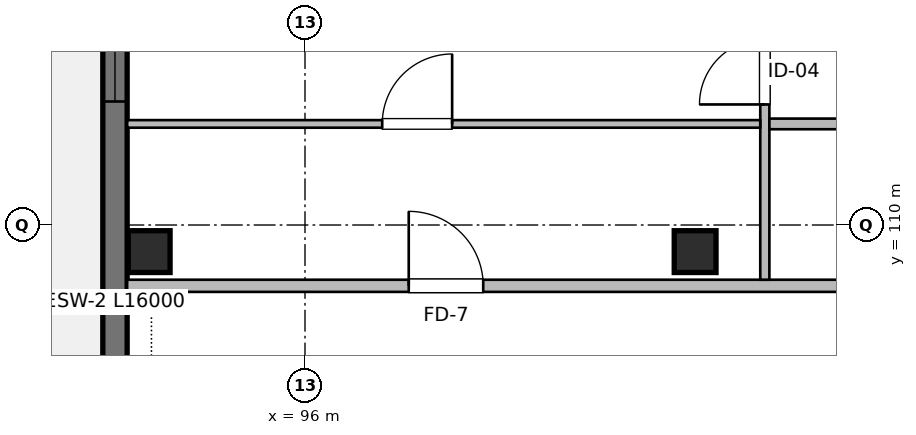
"""IFC4 building model, lengths in metres.
Left out: names, types, materials, properties, quantities, classifications, styles, units other than length and angle.
Written with IfcOpenShell. Run it as: python <this file> out.ifc"""

import sys

from ifc_helpers import new_model, si_unit, direction, frame, frame_2d, origin, origin_2d, place, context, subcontext, project, spatial, rectangle, extrude, element, fill, save


model = new_model("IFC4")
c1 = context("Model", 3, precision=1e-05, world=origin(), true_north=direction((0.0, 1.0)))
c2 = subcontext(c1, "Body", "Model", "MODEL_VIEW")
j1 = project(units=[si_unit("LENGTHUNIT", "METRE"), si_unit("PLANEANGLEUNIT", "RADIAN")], contexts=[c1])
p1 = place(None, origin())
s1 = spatial("IfcSite", under=j1, at=p1, CompositionType="ELEMENT")
p2 = place(p1, origin())
s2 = spatial("IfcBuilding", under=s1, at=p2, CompositionType="ELEMENT")
p3 = place(p2, frame((0.0, 0.0, 23.36)))
s3 = spatial("IfcBuildingStorey", under=s2, at=p3, CompositionType="ELEMENT", Elevation=23.36)
for number, where, z_axis, x_axis in (
    (1, (93.95, 109.65, 0.0), (0.0, 0.0, 1.0), (1.0, 0.0, 0.0)),
    (2, (101.133, 109.65, 0.0), (0.0, 0.0, 1.0), (1.0, 0.0, 0.0)),
):
    element("IfcColumn", number, at=place(p3, frame(where, z_axis=z_axis, x_axis=x_axis)), inside=s3, PredefinedType="COLUMN", context=c2, shape_type="SweptSolid", body=[
        extrude(rectangle(XDim=0.55, YDim=0.55, at=origin_2d()), origin(), (0.0, 0.0, 1.0), 3.2),
    ])
p4 = place(p3, frame((93.5, 100.0, 0.0), z_axis=(0.0, 0.0, 1.0), x_axis=(0.0, 1.0, 0.0)))
e3 = element("IfcWall", 3, at=p4, inside=s3, PredefinedType="SHEAR", context=c2, shape_type="SweptSolid", body=[
    extrude(rectangle(XDim=16.0, YDim=0.32, at=frame_2d((8.0, 0.0))), origin(), (0.0, 0.0, 1.0), 2.98),
])
p5 = place(p4, frame((3.4, 0.0, 0.0)))
e4 = element("IfcOpeningElement", 4, at=p5, cuts=e3, PredefinedType="OPENING", context=c2, shape_type="SweptSolid", body=[
    extrude(rectangle(XDim=1.2, YDim=2.2, at=frame_2d((0.6, 1.1))), frame((0.0, 0.17, 0.0), z_axis=(0.0, -1.0, 0.0), x_axis=(1.0, 0.0, 0.0)), (0.0, 0.0, 1.0), 0.34),
])
p6 = place(p4, frame((5.3, 0.0, 0.9)))
e5 = element("IfcOpeningElement", 5, at=p6, cuts=e3, PredefinedType="OPENING", context=c2, shape_type="SweptSolid", body=[
    extrude(rectangle(XDim=1.05, YDim=1.15, at=frame_2d((0.525, 0.575))), frame((0.0, 0.17, 0.0), z_axis=(0.0, -1.0, 0.0), x_axis=(1.0, 0.0, 0.0)), (0.0, 0.0, 1.0), 0.34),
])
p7 = place(p4, frame((11.625, 0.0, 0.77)))
e6 = element("IfcOpeningElement", 6, at=p7, cuts=e3, PredefinedType="OPENING", context=c2, shape_type="SweptSolid", body=[
    extrude(rectangle(XDim=1.65, YDim=1.45, at=frame_2d((0.825, 0.725))), frame((0.0, 0.17, 0.0), z_axis=(0.0, -1.0, 0.0), x_axis=(1.0, 0.0, 0.0)), (0.0, 0.0, 1.0), 0.34),
])
p8 = place(p3, frame((93.66, 109.2, 0.0), z_axis=(0.0, 0.0, 1.0), x_axis=(1.0, 0.0, 0.0)))
e7 = element("IfcWall", 7, at=p8, inside=s3, PredefinedType="PARTITIONING", context=c2, shape_type="SweptSolid", body=[
    extrude(rectangle(XDim=43.68, YDim=0.16, at=frame_2d((21.84, 0.0))), origin(), (0.0, 0.0, 1.0), 2.935),
])
p9 = place(p8, frame((3.705, 0.0, 0.0)))
e8 = element("IfcOpeningElement", 8, at=p9, cuts=e7, PredefinedType="OPENING", context=c2, shape_type="SweptSolid", body=[
    extrude(rectangle(XDim=0.98, YDim=2.15, at=frame_2d((0.49, 1.075))), frame((0.0, 0.09, 0.0), z_axis=(0.0, -1.0, 0.0), x_axis=(1.0, 0.0, 0.0)), (0.0, 0.0, 1.0), 0.18),
])
p10 = place(p8, frame((18.33, 0.0, 0.0)))
e9 = element("IfcOpeningElement", 9, at=p10, cuts=e7, PredefinedType="OPENING", context=c2, shape_type="SweptSolid", body=[
    extrude(rectangle(XDim=0.98, YDim=2.15, at=frame_2d((0.49, 1.075))), frame((0.0, 0.09, 0.0), z_axis=(0.0, -1.0, 0.0), x_axis=(1.0, 0.0, 0.0)), (0.0, 0.0, 1.0), 0.18),
])
p11 = place(p8, frame((32.915, 0.0, 0.0)))
e10 = element("IfcOpeningElement", 10, at=p11, cuts=e7, PredefinedType="OPENING", context=c2, shape_type="SweptSolid", body=[
    extrude(rectangle(XDim=0.98, YDim=2.15, at=frame_2d((0.49, 1.075))), frame((0.0, 0.09, 0.0), z_axis=(0.0, -1.0, 0.0), x_axis=(1.0, 0.0, 0.0)), (0.0, 0.0, 1.0), 0.18),
])
p12 = place(p3, frame((102.05, 109.28, 0.0), z_axis=(0.0, 0.0, 1.0), x_axis=(0.0, 1.0, 0.0)))
e11 = element("IfcWall", 11, at=p12, inside=s3, PredefinedType="PARTITIONING", context=c2, shape_type="SweptSolid", body=[
    extrude(rectangle(XDim=6.6, YDim=0.12, at=frame_2d((3.3, 0.0))), origin(), (0.0, 0.0, 1.0), 2.935),
])
p13 = place(p12, frame((2.306, 0.0, 0.0)))
e12 = element("IfcOpeningElement", 12, at=p13, cuts=e11, PredefinedType="OPENING", context=c2, shape_type="SweptSolid", body=[
    extrude(rectangle(XDim=0.86, YDim=2.1, at=frame_2d((0.43, 1.05))), frame((0.0, 0.07, 0.0), z_axis=(0.0, -1.0, 0.0), x_axis=(1.0, 0.0, 0.0)), (0.0, 0.0, 1.0), 0.14),
])
p14 = place(p12, frame((4.097, 0.0, 0.0)))
e13 = element("IfcOpeningElement", 13, at=p14, cuts=e11, PredefinedType="OPENING", context=c2, shape_type="SweptSolid", body=[
    extrude(rectangle(XDim=0.9, YDim=2.1, at=frame_2d((0.45, 1.05))), frame((0.0, 0.07, 0.0), z_axis=(0.0, -1.0, 0.0), x_axis=(1.0, 0.0, 0.0)), (0.0, 0.0, 1.0), 0.14),
])
p15 = place(p3, frame((102.11, 111.33, 0.0), z_axis=(0.0, 0.0, 1.0), x_axis=(1.0, 0.0, 0.0)))
e14 = element("IfcWall", 14, at=p15, inside=s3, PredefinedType="PARTITIONING", context=c2, shape_type="SweptSolid", body=[
    extrude(rectangle(XDim=6.02, YDim=0.14, at=frame_2d((3.01, 0.0))), origin(), (0.0, 0.0, 1.0), 2.935),
])
p16 = place(p15, frame((2.432, 0.0, 0.0)))
e15 = element("IfcOpeningElement", 15, at=p16, cuts=e14, PredefinedType="OPENING", context=c2, shape_type="SweptSolid", body=[
    extrude(rectangle(XDim=0.85, YDim=2.05, at=frame_2d((0.425, 1.025))), frame((0.0, 0.08, 0.0), z_axis=(0.0, -1.0, 0.0), x_axis=(1.0, 0.0, 0.0)), (0.0, 0.0, 1.0), 0.16),
])
p17 = place(p3, frame((93.66, 111.33, 0.0), z_axis=(0.0, 0.0, 1.0), x_axis=(1.0, 0.0, 0.0)))
e16 = element("IfcWall", 16, at=p17, inside=s3, PredefinedType="PARTITIONING", context=c2, shape_type="SweptSolid", body=[
    extrude(rectangle(XDim=8.33, YDim=0.1, at=frame_2d((4.165, 0.0))), origin(), (0.0, 0.0, 1.0), 2.935),
])
p18 = place(p17, frame((3.356, 0.0, 0.0)))
e17 = element("IfcOpeningElement", 17, at=p18, cuts=e16, PredefinedType="OPENING", context=c2, shape_type="SweptSolid", body=[
    extrude(rectangle(XDim=0.92, YDim=2.1, at=frame_2d((0.46, 1.05))), frame((0.0, 0.06, 0.0), z_axis=(0.0, -1.0, 0.0), x_axis=(1.0, 0.0, 0.0)), (0.0, 0.0, 1.0), 0.12),
])
p19 = place(p7, origin())
e18 = element("IfcWindow", 18, at=p19, inside=s3, PartitioningType="SINGLE_PANEL", PredefinedType="WINDOW", context=c2, shape_type="SweptSolid", body=[
    extrude(rectangle(XDim=1.65, YDim=1.45, at=frame_2d((0.825, 0.725))), frame((0.0, 0.03, 0.0), z_axis=(0.0, -1.0, 0.0), x_axis=(1.0, 0.0, 0.0)), (0.0, 0.0, 1.0), 0.06),
])
fill(e6, e18)
p20 = place(p9, origin())
e19 = element("IfcDoor", 19, at=p20, inside=s3, OperationType="SINGLE_SWING_LEFT", PredefinedType="DOOR", context=c2, shape_type="SweptSolid", body=[
    extrude(rectangle(XDim=0.98, YDim=2.15, at=frame_2d((0.49, 1.075))), frame((0.0, 0.025, 0.0), z_axis=(0.0, -1.0, 0.0), x_axis=(1.0, 0.0, 0.0)), (0.0, 0.0, 1.0), 0.05),
])
fill(e8, e19)
p21 = place(p18, origin())
e20 = element("IfcDoor", 20, at=p21, inside=s3, OperationType="SINGLE_SWING_RIGHT", PredefinedType="DOOR", context=c2, shape_type="SweptSolid", body=[
    extrude(rectangle(XDim=0.92, YDim=2.1, at=frame_2d((0.46, 1.05))), frame((0.0, 0.025, 0.0), z_axis=(0.0, -1.0, 0.0), x_axis=(1.0, 0.0, 0.0)), (0.0, 0.0, 1.0), 0.05),
])
fill(e17, e20)
p22 = place(p13, origin())
e21 = element("IfcDoor", 21, at=p22, inside=s3, OperationType="SINGLE_SWING_LEFT", PredefinedType="DOOR", context=c2, shape_type="SweptSolid", body=[
    extrude(rectangle(XDim=0.86, YDim=2.1, at=frame_2d((0.43, 1.05))), frame((0.0, 0.025, 0.0), z_axis=(0.0, -1.0, 0.0), x_axis=(1.0, 0.0, 0.0)), (0.0, 0.0, 1.0), 0.05),
])
fill(e12, e21)
save(model, sys.argv[1])
